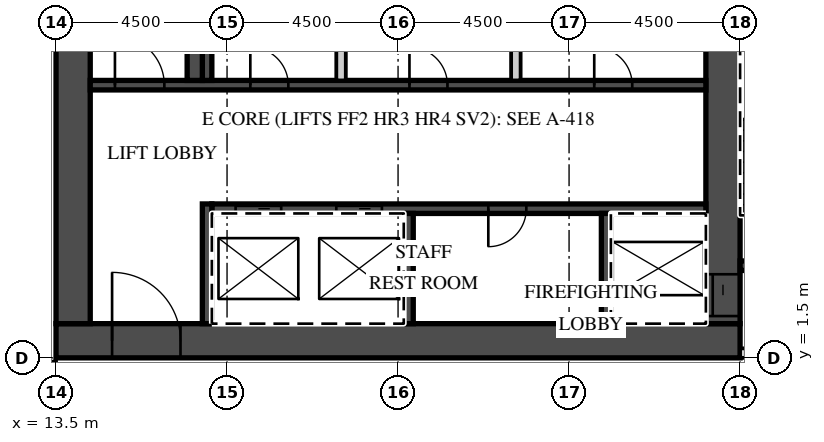
"""IFC4 building model, lengths in metres.
Left out: names, types, materials, properties, quantities, classifications, styles, units other than length and angle.
Written with IfcOpenShell. Run it as: python <this file> out.ifc"""

import sys

from ifc_helpers import new_model, si_unit, direction, frame, frame_2d, origin, place, context, subcontext, project, spatial, rectangle, extrude, element, fill, save


model = new_model("IFC4")
c1 = context("Model", 3, precision=1e-05, world=origin(), true_north=direction((0.0, 1.0)))
c2 = subcontext(c1, "Body", "Model", "MODEL_VIEW")
j1 = project(units=[si_unit("LENGTHUNIT", "METRE"), si_unit("PLANEANGLEUNIT", "RADIAN")], contexts=[c1])
p1 = place(None, origin())
s1 = spatial("IfcSite", under=j1, at=p1, CompositionType="ELEMENT")
p2 = place(p1, origin())
s2 = spatial("IfcBuilding", under=s1, at=p2, CompositionType="ELEMENT")
p3 = place(p2, frame((0.0, 0.0, 271.8)))
s3 = spatial("IfcBuildingStorey", under=s2, at=p3, CompositionType="ELEMENT", Elevation=271.8)
p4 = place(p3, frame((-39.909, 1.3, 0.0), z_axis=(0.0, 0.0, 1.0), x_axis=(1.0, 0.0, 0.0)))
e1 = element("IfcWall", 1, at=p4, inside=s3, PredefinedType="PARTITIONING", context=c2, shape_type="SweptSolid", body=[
    extrude(rectangle(XDim=53.409, YDim=0.2, at=frame_2d((26.705, 0.0))), origin(), (0.0, 0.0, 1.0), 3.02),
])
p5 = place(p4, frame((0.15, 0.0, 0.0)))
e2 = element("IfcOpeningElement", 2, at=p5, cuts=e1, PredefinedType="OPENING", context=c2, shape_type="SweptSolid", body=[
    extrude(rectangle(XDim=0.9, YDim=2.1, at=frame_2d((0.45, 1.05))), frame((0.0, 0.11, 0.0), z_axis=(0.0, -1.0, 0.0), x_axis=(1.0, 0.0, 0.0)), (0.0, 0.0, 1.0), 0.22),
])
p6 = place(p4, frame((9.271, 0.0, 0.0)))
e3 = element("IfcOpeningElement", 3, at=p6, cuts=e1, PredefinedType="OPENING", context=c2, shape_type="SweptSolid", body=[
    extrude(rectangle(XDim=1.2, YDim=2.1, at=frame_2d((0.6, 1.05))), frame((0.0, 0.11, 0.0), z_axis=(0.0, -1.0, 0.0), x_axis=(1.0, 0.0, 0.0)), (0.0, 0.0, 1.0), 0.22),
])
p7 = place(p4, frame((18.271, 0.0, 0.0)))
e4 = element("IfcOpeningElement", 4, at=p7, cuts=e1, PredefinedType="OPENING", context=c2, shape_type="SweptSolid", body=[
    extrude(rectangle(XDim=1.2, YDim=2.1, at=frame_2d((0.6, 1.05))), frame((0.0, 0.11, 0.0), z_axis=(0.0, -1.0, 0.0), x_axis=(1.0, 0.0, 0.0)), (0.0, 0.0, 1.0), 0.22),
])
p8 = place(p4, frame((27.271, 0.0, 0.0)))
e5 = element("IfcOpeningElement", 5, at=p8, cuts=e1, PredefinedType="OPENING", context=c2, shape_type="SweptSolid", body=[
    extrude(rectangle(XDim=1.2, YDim=2.1, at=frame_2d((0.6, 1.05))), frame((0.0, 0.11, 0.0), z_axis=(0.0, -1.0, 0.0), x_axis=(1.0, 0.0, 0.0)), (0.0, 0.0, 1.0), 0.22),
])
p9 = place(p4, frame((36.271, 0.0, 0.0)))
e6 = element("IfcOpeningElement", 6, at=p9, cuts=e1, PredefinedType="OPENING", context=c2, shape_type="SweptSolid", body=[
    extrude(rectangle(XDim=1.2, YDim=2.1, at=frame_2d((0.6, 1.05))), frame((0.0, 0.11, 0.0), z_axis=(0.0, -1.0, 0.0), x_axis=(1.0, 0.0, 0.0)), (0.0, 0.0, 1.0), 0.22),
])
p10 = place(p4, frame((42.346, 0.0, 0.0)))
e7 = element("IfcOpeningElement", 7, at=p10, cuts=e1, PredefinedType="OPENING", context=c2, shape_type="SweptSolid", body=[
    extrude(rectangle(XDim=1.2, YDim=2.1, at=frame_2d((0.6, 1.05))), frame((0.0, 0.11, 0.0), z_axis=(0.0, -1.0, 0.0), x_axis=(1.0, 0.0, 0.0)), (0.0, 0.0, 1.0), 0.22),
])
p11 = place(p4, frame((51.834, 0.0, 0.0)))
e8 = element("IfcOpeningElement", 8, at=p11, cuts=e1, PredefinedType="OPENING", context=c2, shape_type="SweptSolid", body=[
    extrude(rectangle(XDim=1.0, YDim=2.1, at=frame_2d((0.5, 1.05))), frame((0.0, 0.11, 0.0), z_axis=(0.0, -1.0, 0.0), x_axis=(1.0, 0.0, 0.0)), (0.0, 0.0, 1.0), 0.22),
])
p12 = place(p3, frame((13.5, 1.95, 0.0), z_axis=(0.0, 0.0, 1.0), x_axis=(1.0, 0.0, 0.0)))
e9 = element("IfcWall", 9, at=p12, inside=s3, PredefinedType="SHEAR", context=c2, shape_type="SweptSolid", body=[
    extrude(rectangle(XDim=18.0, YDim=0.9, at=frame_2d((9.0, 0.0))), origin(), (0.0, 0.0, 1.0), 3.02),
])
p13 = place(p12, frame((1.475, 0.0, 0.0)))
e10 = element("IfcOpeningElement", 10, at=p13, cuts=e9, PredefinedType="OPENING", context=c2, shape_type="SweptSolid", body=[
    extrude(rectangle(XDim=1.8, YDim=2.1, at=frame_2d((0.9, 1.05))), frame((0.0, 0.46, 0.0), z_axis=(0.0, -1.0, 0.0), x_axis=(1.0, 0.0, 0.0)), (0.0, 0.0, 1.0), 0.92),
])
p14 = place(p3, frame((31.05, 2.4, 0.0), z_axis=(0.0, 0.0, 1.0), x_axis=(0.0, 1.0, 0.0)))
e11 = element("IfcWall", 11, at=p14, inside=s3, PredefinedType="SHEAR", context=c2, shape_type="SweptSolid", body=[
    extrude(rectangle(XDim=12.8, YDim=0.9, at=frame_2d((6.4, 0.0))), origin(), (0.0, 0.0, 1.0), 3.02),
])
p15 = place(p14, frame((0.2, 0.0, 0.0)))
e12 = element("IfcOpeningElement", 12, at=p15, cuts=e11, PredefinedType="OPENING", context=c2, shape_type="SweptSolid", body=[
    extrude(rectangle(XDim=1.1, YDim=2.1, at=frame_2d((0.55, 1.05))), frame((0.0, 0.46, 0.0), z_axis=(0.0, -1.0, 0.0), x_axis=(1.0, 0.0, 0.0)), (0.0, 0.0, 1.0), 0.92),
])
p16 = place(p3, frame((13.95, 2.4, 0.0), z_axis=(0.0, 0.0, 1.0), x_axis=(0.0, 1.0, 0.0)))
e13 = element("IfcWall", 13, at=p16, inside=s3, PredefinedType="SHEAR", context=c2, shape_type="SweptSolid", body=[
    extrude(rectangle(XDim=12.2, YDim=0.9, at=frame_2d((6.1, 0.0))), origin(), (0.0, 0.0, 1.0), 3.02),
])
p17 = place(p3, frame((17.6, 5.425, 0.0), z_axis=(0.0, 0.0, 1.0), x_axis=(1.0, 0.0, 0.0)))
e14 = element("IfcWall", 14, at=p17, inside=s3, PredefinedType="SHEAR", context=c2, shape_type="SweptSolid", body=[
    extrude(rectangle(XDim=13.0, YDim=0.25, at=frame_2d((6.5, 0.0))), origin(), (0.0, 0.0, 1.0), 3.02),
])
p18 = place(p17, frame((3.275, 0.0, 0.0)))
e15 = element("IfcOpeningElement", 15, at=p18, cuts=e14, PredefinedType="OPENING", context=c2, shape_type="SweptSolid", body=[
    extrude(rectangle(XDim=1.2, YDim=2.1, at=frame_2d((0.6, 1.05))), frame((0.0, 0.135, 0.0), z_axis=(0.0, -1.0, 0.0), x_axis=(1.0, 0.0, 0.0)), (0.0, 0.0, 1.0), 0.27),
])
p19 = place(p17, frame((0.625, 0.0, 0.0)))
e16 = element("IfcOpeningElement", 16, at=p19, cuts=e14, PredefinedType="OPENING", context=c2, shape_type="SweptSolid", body=[
    extrude(rectangle(XDim=1.2, YDim=2.1, at=frame_2d((0.6, 1.05))), frame((0.0, 0.135, 0.0), z_axis=(0.0, -1.0, 0.0), x_axis=(1.0, 0.0, 0.0)), (0.0, 0.0, 1.0), 0.27),
])
p20 = place(p17, frame((7.275, 0.0, 0.0)))
e17 = element("IfcOpeningElement", 17, at=p20, cuts=e14, PredefinedType="OPENING", context=c2, shape_type="SweptSolid", body=[
    extrude(rectangle(XDim=1.0, YDim=2.1, at=frame_2d((0.5, 1.05))), frame((0.0, 0.135, 0.0), z_axis=(0.0, -1.0, 0.0), x_axis=(1.0, 0.0, 0.0)), (0.0, 0.0, 1.0), 0.27),
])
p21 = place(p3, frame((17.475, 2.4, 0.0), z_axis=(0.0, 0.0, 1.0), x_axis=(0.0, 1.0, 0.0)))
e18 = element("IfcWall", 18, at=p21, inside=s3, PredefinedType="SHEAR", context=c2, shape_type="SweptSolid", body=[
    extrude(rectangle(XDim=3.15, YDim=0.25, at=frame_2d((1.575, 0.0))), origin(), (0.0, 0.0, 1.0), 3.02),
])
for number, where, z_axis, x_axis in (
    (19, (27.975, 2.4, 0.0), (0.0, 0.0, 1.0), (0.0, 1.0, 0.0)),
    (20, (22.775, 2.4, 0.0), (0.0, 0.0, 1.0), (0.0, 1.0, 0.0)),
):
    element("IfcWall", number, at=place(p3, frame(where, z_axis=z_axis, x_axis=x_axis)), inside=s3, PredefinedType="SHEAR", context=c2, shape_type="SweptSolid", body=[
        extrude(rectangle(XDim=2.9, YDim=0.25, at=frame_2d((1.45, 0.0))), origin(), (0.0, 0.0, 1.0), 3.02),
    ])
p22 = place(p3, frame((14.4, 8.675, 0.0), z_axis=(0.0, 0.0, 1.0), x_axis=(1.0, 0.0, 0.0)))
e21 = element("IfcWall", 21, at=p22, inside=s3, PredefinedType="SHEAR", context=c2, shape_type="SweptSolid", body=[
    extrude(rectangle(XDim=16.2, YDim=0.25, at=frame_2d((8.1, 0.0))), origin(), (0.0, 0.0, 1.0), 3.02),
])
p23 = place(p22, frame((0.65, 0.0, 0.0)))
e22 = element("IfcOpeningElement", 22, at=p23, cuts=e21, PredefinedType="OPENING", context=c2, shape_type="SweptSolid", body=[
    extrude(rectangle(XDim=1.3, YDim=2.1, at=frame_2d((0.65, 1.05))), frame((0.0, 0.135, 0.0), z_axis=(0.0, -1.0, 0.0), x_axis=(1.0, 0.0, 0.0)), (0.0, 0.0, 1.0), 0.27),
])
p24 = place(p22, frame((13.262, 0.0, 0.0)))
e23 = element("IfcOpeningElement", 23, at=p24, cuts=e21, PredefinedType="OPENING", context=c2, shape_type="SweptSolid", body=[
    extrude(rectangle(XDim=1.0, YDim=2.1, at=frame_2d((0.5, 1.05))), frame((0.0, 0.135, 0.0), z_axis=(0.0, -1.0, 0.0), x_axis=(1.0, 0.0, 0.0)), (0.0, 0.0, 1.0), 0.27),
])
p25 = place(p22, frame((8.4, 0.0, 0.0)))
e24 = element("IfcOpeningElement", 24, at=p25, cuts=e21, PredefinedType="OPENING", context=c2, shape_type="SweptSolid", body=[
    extrude(rectangle(XDim=1.0, YDim=2.1, at=frame_2d((0.5, 1.05))), frame((0.0, 0.135, 0.0), z_axis=(0.0, -1.0, 0.0), x_axis=(1.0, 0.0, 0.0)), (0.0, 0.0, 1.0), 0.27),
])
p26 = place(p22, frame((4.212, 0.0, 0.0)))
e25 = element("IfcOpeningElement", 25, at=p26, cuts=e21, PredefinedType="OPENING", context=c2, shape_type="SweptSolid", body=[
    extrude(rectangle(XDim=1.0, YDim=2.1, at=frame_2d((0.5, 1.05))), frame((0.0, 0.135, 0.0), z_axis=(0.0, -1.0, 0.0), x_axis=(1.0, 0.0, 0.0)), (0.0, 0.0, 1.0), 0.27),
])
p27 = place(p3, frame((17.475, 8.8, 0.0), z_axis=(0.0, 0.0, 1.0), x_axis=(0.0, 1.0, 0.0)))
e26 = element("IfcWall", 26, at=p27, inside=s3, PredefinedType="SHEAR", context=c2, shape_type="SweptSolid", body=[
    extrude(rectangle(XDim=2.9, YDim=0.25, at=frame_2d((1.45, 0.0))), origin(), (0.0, 0.0, 1.0), 3.02),
])
for number, where, z_axis, x_axis in (
    (27, (25.6, 8.8, 0.0), (0.0, 0.0, 1.0), (0.0, 1.0, 0.0)),
    (28, (21.0, 8.8, 0.0), (0.0, 0.0, 1.0), (0.0, 1.0, 0.0)),
):
    element("IfcWall", number, at=place(p3, frame(where, z_axis=z_axis, x_axis=x_axis)), inside=s3, PredefinedType="PARTITIONING", context=c2, shape_type="SweptSolid", body=[
        extrude(rectangle(XDim=2.9, YDim=0.25, at=frame_2d((1.45, 0.0))), origin(), (0.0, 0.0, 1.0), 3.02),
    ])
p28 = place(p3, frame((17.15, 8.8, 0.0), z_axis=(0.0, 0.0, 1.0), x_axis=(0.0, 1.0, 0.0)))
e29 = element("IfcWall", 29, at=p28, inside=s3, PredefinedType="SHEAR", context=c2, shape_type="SweptSolid", body=[
    extrude(rectangle(XDim=5.8, YDim=0.4, at=frame_2d((2.9, 0.0))), origin(), (0.0, 0.0, 1.0), 3.02),
])
p29 = place(p3, frame((31.5, 1.625, 0.0), z_axis=(0.0, 0.0, 1.0), x_axis=(1.0, 0.0, 0.0)))
e30 = element("IfcWall", 30, at=p29, inside=s3, PredefinedType="PARTITIONING", context=c2, shape_type="SweptSolid", body=[
    extrude(rectangle(XDim=5.012, YDim=0.25, at=frame_2d((2.506, 0.0))), origin(), (0.0, 0.0, 1.0), 3.02),
])
p30 = place(p29, frame((0.625, 0.0, 0.0)))
e31 = element("IfcOpeningElement", 31, at=p30, cuts=e30, PredefinedType="OPENING", context=c2, shape_type="SweptSolid", body=[
    extrude(rectangle(XDim=1.3, YDim=2.1, at=frame_2d((0.65, 1.05))), frame((0.0, 0.135, 0.0), z_axis=(0.0, -1.0, 0.0), x_axis=(1.0, 0.0, 0.0)), (0.0, 0.0, 1.0), 0.27),
])
p31 = place(p29, frame((3.25, 0.0, 0.0)))
e32 = element("IfcOpeningElement", 32, at=p31, cuts=e30, PredefinedType="OPENING", context=c2, shape_type="SweptSolid", body=[
    extrude(rectangle(XDim=1.1, YDim=2.1, at=frame_2d((0.55, 1.05))), frame((0.0, 0.135, 0.0), z_axis=(0.0, -1.0, 0.0), x_axis=(1.0, 0.0, 0.0)), (0.0, 0.0, 1.0), 0.27),
])
p32 = place(p3, frame((31.5, 3.925, 0.0), z_axis=(0.0, 0.0, 1.0), x_axis=(1.0, 0.0, 0.0)))
e33 = element("IfcWall", 33, at=p32, inside=s3, PredefinedType="SHEAR", context=c2, shape_type="SweptSolid", body=[
    extrude(rectangle(XDim=2.55, YDim=0.25, at=frame_2d((1.275, 0.0))), origin(), (0.0, 0.0, 1.0), 3.02),
])
p33 = place(p32, frame((0.625, 0.0, 0.0)))
e34 = element("IfcOpeningElement", 34, at=p33, cuts=e33, PredefinedType="OPENING", context=c2, shape_type="SweptSolid", body=[
    extrude(rectangle(XDim=1.3, YDim=2.1, at=frame_2d((0.65, 1.05))), frame((0.0, 0.135, 0.0), z_axis=(0.0, -1.0, 0.0), x_axis=(1.0, 0.0, 0.0)), (0.0, 0.0, 1.0), 0.27),
])
p34 = place(p18, origin())
e35 = element("IfcDoor", 35, at=p34, inside=s3, OperationType="SLIDING_TO_RIGHT", PredefinedType="DOOR", context=c2, shape_type="SweptSolid", body=[
    extrude(rectangle(XDim=1.2, YDim=2.1, at=frame_2d((0.6, 1.05))), frame((0.0, 0.025, 0.0), z_axis=(0.0, -1.0, 0.0), x_axis=(1.0, 0.0, 0.0)), (0.0, 0.0, 1.0), 0.05),
])
fill(e15, e35)
p35 = place(p19, origin())
e36 = element("IfcDoor", 36, at=p35, inside=s3, OperationType="SLIDING_TO_LEFT", PredefinedType="DOOR", context=c2, shape_type="SweptSolid", body=[
    extrude(rectangle(XDim=1.2, YDim=2.1, at=frame_2d((0.6, 1.05))), frame((0.0, 0.025, 0.0), z_axis=(0.0, -1.0, 0.0), x_axis=(1.0, 0.0, 0.0)), (0.0, 0.0, 1.0), 0.05),
])
fill(e16, e36)
p36 = place(p15, origin())
e37 = element("IfcDoor", 37, at=p36, inside=s3, OperationType="SLIDING_TO_LEFT", PredefinedType="DOOR", context=c2, shape_type="SweptSolid", body=[
    extrude(rectangle(XDim=1.1, YDim=2.1, at=frame_2d((0.55, 1.05))), frame((0.0, 0.025, 0.0), z_axis=(0.0, -1.0, 0.0), x_axis=(1.0, 0.0, 0.0)), (0.0, 0.0, 1.0), 0.05),
])
fill(e12, e37)
p37 = place(p13, origin())
e38 = element("IfcDoor", 38, at=p37, inside=s3, OperationType="DOUBLE_DOOR_DOUBLE_SWING", PredefinedType="DOOR", context=c2, shape_type="SweptSolid", body=[
    extrude(rectangle(XDim=1.8, YDim=2.1, at=frame_2d((0.9, 1.05))), frame((0.0, 0.025, 0.0), z_axis=(0.0, -1.0, 0.0), x_axis=(1.0, 0.0, 0.0)), (0.0, 0.0, 1.0), 0.05),
])
fill(e10, e38)
p38 = place(p23, origin())
e39 = element("IfcDoor", 39, at=p38, inside=s3, OperationType="SINGLE_SWING_LEFT", PredefinedType="DOOR", context=c2, shape_type="SweptSolid", body=[
    extrude(rectangle(XDim=1.3, YDim=2.1, at=frame_2d((0.65, 1.05))), frame((0.0, 0.025, 0.0), z_axis=(0.0, -1.0, 0.0), x_axis=(1.0, 0.0, 0.0)), (0.0, 0.0, 1.0), 0.05),
])
fill(e22, e39)
p39 = place(p24, origin())
e40 = element("IfcDoor", 40, at=p39, inside=s3, OperationType="SINGLE_SWING_LEFT", PredefinedType="DOOR", context=c2, shape_type="SweptSolid", body=[
    extrude(rectangle(XDim=1.0, YDim=2.1, at=frame_2d((0.5, 1.05))), frame((0.0, 0.025, 0.0), z_axis=(0.0, -1.0, 0.0), x_axis=(1.0, 0.0, 0.0)), (0.0, 0.0, 1.0), 0.05),
])
fill(e23, e40)
p40 = place(p25, origin())
e41 = element("IfcDoor", 41, at=p40, inside=s3, OperationType="SINGLE_SWING_LEFT", PredefinedType="DOOR", context=c2, shape_type="SweptSolid", body=[
    extrude(rectangle(XDim=1.0, YDim=2.1, at=frame_2d((0.5, 1.05))), frame((0.0, 0.025, 0.0), z_axis=(0.0, -1.0, 0.0), x_axis=(1.0, 0.0, 0.0)), (0.0, 0.0, 1.0), 0.05),
])
fill(e24, e41)
p41 = place(p26, origin())
e42 = element("IfcDoor", 42, at=p41, inside=s3, OperationType="SINGLE_SWING_LEFT", PredefinedType="DOOR", context=c2, shape_type="SweptSolid", body=[
    extrude(rectangle(XDim=1.0, YDim=2.1, at=frame_2d((0.5, 1.05))), frame((0.0, 0.025, 0.0), z_axis=(0.0, -1.0, 0.0), x_axis=(1.0, 0.0, 0.0)), (0.0, 0.0, 1.0), 0.05),
])
fill(e25, e42)
p42 = place(p20, origin())
e43 = element("IfcDoor", 43, at=p42, inside=s3, OperationType="SINGLE_SWING_LEFT", PredefinedType="DOOR", context=c2, shape_type="SweptSolid", body=[
    extrude(rectangle(XDim=1.0, YDim=2.1, at=frame_2d((0.5, 1.05))), frame((0.0, 0.025, 0.0), z_axis=(0.0, -1.0, 0.0), x_axis=(1.0, 0.0, 0.0)), (0.0, 0.0, 1.0), 0.05),
])
fill(e17, e43)
save(model, sys.argv[1])
